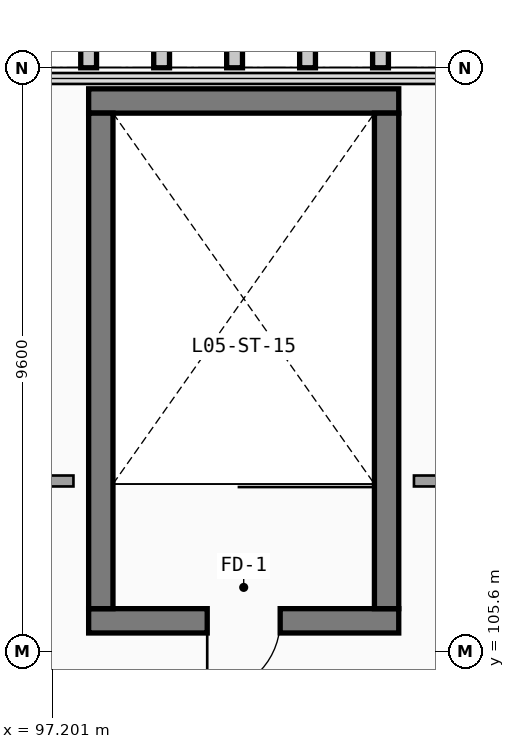
"""IFC4 building model, lengths in metres.
Left out: names, types, materials, properties, quantities, classifications, styles, units other than length and angle.
Written with IfcOpenShell. Run it as: python <this file> out.ifc"""

import sys

from ifc_helpers import new_model, si_unit, direction, frame, frame_2d, origin, place, context, subcontext, project, spatial, rectangle, extrude, element, fill, save


model = new_model("IFC4")
c1 = context("Model", 3, precision=1e-05, world=origin(), true_north=direction((0.0, 1.0)))
c2 = subcontext(c1, "Body", "Model", "MODEL_VIEW")
j1 = project(units=[si_unit("LENGTHUNIT", "METRE"), si_unit("PLANEANGLEUNIT", "RADIAN")], contexts=[c1])
p1 = place(None, origin())
s1 = spatial("IfcSite", under=j1, at=p1, CompositionType="ELEMENT")
p2 = place(p1, origin())
s2 = spatial("IfcBuilding", under=s1, at=p2, CompositionType="ELEMENT")
p3 = place(p2, frame((0.0, 0.0, 23.1)))
s3 = spatial("IfcBuildingStorey", under=s2, at=p3, CompositionType="ELEMENT", Elevation=23.1)
p4 = place(p3, frame((97.8, 106.1, 0.0), z_axis=(0.0, 0.0, 1.0), x_axis=(1.0, 0.0, 0.0)))
e1 = element("IfcWall", 1, at=p4, inside=s3, PredefinedType="SHEAR", context=c2, shape_type="SweptSolid", body=[
    extrude(rectangle(XDim=5.1, YDim=0.4, at=frame_2d((2.55, 0.0))), origin(), (0.0, 0.0, 1.0), 4.82),
])
p5 = place(p4, frame((3.15, 0.0, 0.0), z_axis=(0.0, 0.0, 1.0), x_axis=(-1.0, 0.0, 0.0)))
e2 = element("IfcOpeningElement", 2, at=p5, cuts=e1, PredefinedType="OPENING", context=c2, shape_type="SweptSolid", body=[
    extrude(rectangle(XDim=1.2, YDim=2.2, at=frame_2d((0.6, 1.1))), frame((0.0, 0.21, 0.0), z_axis=(0.0, -1.0, 0.0), x_axis=(1.0, 0.0, 0.0)), (0.0, 0.0, 1.0), 0.42),
])
p6 = place(p3, frame((102.9, 114.65, 0.0), z_axis=(0.0, 0.0, 1.0), x_axis=(-1.0, 0.0, 0.0)))
e3 = element("IfcWall", 3, at=p6, inside=s3, PredefinedType="SHEAR", context=c2, shape_type="SweptSolid", body=[
    extrude(rectangle(XDim=5.1, YDim=0.4, at=frame_2d((2.55, 0.0))), origin(), (0.0, 0.0, 1.0), 4.82),
])
for number, where, z_axis, x_axis in (
    (4, (98.0, 114.45, 0.0), (0.0, 0.0, 1.0), (0.0, -1.0, 0.0)),
    (5, (102.7, 106.3, 0.0), (0.0, 0.0, 1.0), (0.0, 1.0, 0.0)),
):
    element("IfcWall", number, at=place(p3, frame(where, z_axis=z_axis, x_axis=x_axis)), inside=s3, PredefinedType="SHEAR", context=c2, shape_type="SweptSolid", body=[
        extrude(rectangle(XDim=8.15, YDim=0.4, at=frame_2d((4.075, 0.0))), origin(), (0.0, 0.0, 1.0), 4.82),
    ])
p7 = place(p3, frame((92.38, 108.4, 0.0), z_axis=(0.0, 0.0, 1.0), x_axis=(1.0, 0.0, 0.0)))
e6 = element("IfcWall", 6, at=p7, inside=s3, PredefinedType="PARTITIONING", context=c2, shape_type="SweptSolid", body=[
    extrude(rectangle(XDim=5.17, YDim=0.18, at=frame_2d((2.585, 0.0))), origin(), (0.0, 0.0, 1.0), 4.82),
])
p8 = place(p3, frame((103.15, 108.4, 0.0), z_axis=(0.0, 0.0, 1.0), x_axis=(1.0, 0.0, 0.0)))
e7 = element("IfcWall", 7, at=p8, inside=s3, PredefinedType="PARTITIONING", context=c2, shape_type="SweptSolid", body=[
    extrude(rectangle(XDim=3.67, YDim=0.18, at=frame_2d((1.835, 0.0))), origin(), (0.0, 0.0, 1.0), 4.82),
])
p9 = place(p5, origin())
e8 = element("IfcDoor", 8, at=p9, inside=s3, OperationType="SINGLE_SWING_RIGHT", PredefinedType="DOOR", context=c2, shape_type="SweptSolid", body=[
    extrude(rectangle(XDim=1.2, YDim=2.2, at=frame_2d((0.6, 1.1))), frame((0.0, 0.025, 0.0), z_axis=(0.0, -1.0, 0.0), x_axis=(1.0, 0.0, 0.0)), (0.0, 0.0, 1.0), 0.05),
])
fill(e2, e8)
save(model, sys.argv[1])
